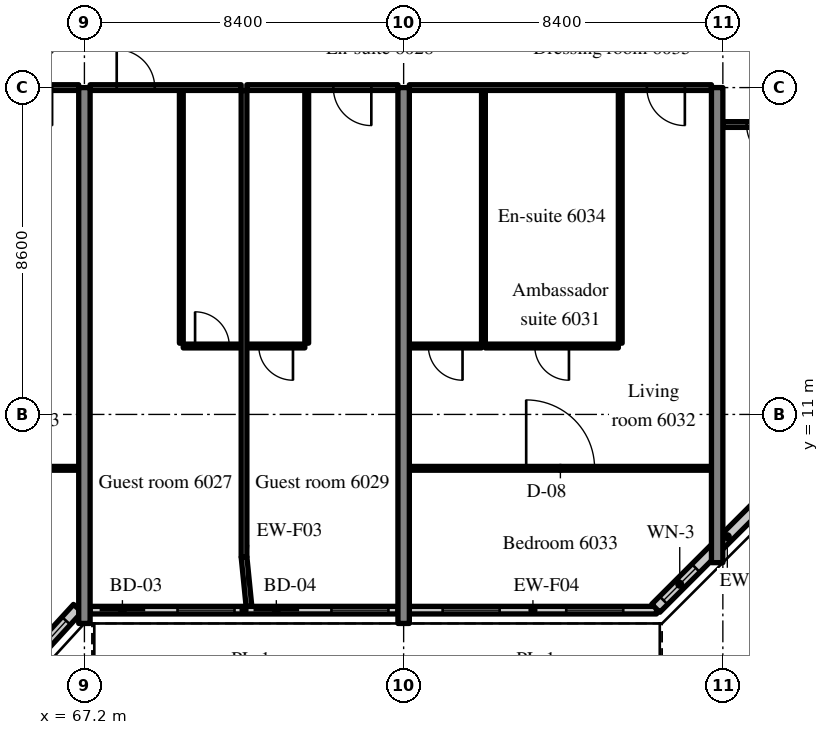
"""IFC4 building model, lengths in metres.
Left out: names, types, materials, properties, quantities, classifications, styles, units other than length and angle.
Written with IfcOpenShell. Run it as: python <this file> out.ifc"""

import sys

from ifc_helpers import new_model, si_unit, direction, frame, frame_2d, origin, place, context, subcontext, project, spatial, rectangle, extrude, source, transform, mapped, element, fill, save


model = new_model("IFC4")
c1 = context("Model", 3, precision=1e-05, world=origin(), true_north=direction((0.0, 1.0)))
c2 = subcontext(c1, "Body", "Model", "MODEL_VIEW")
j1 = project(units=[si_unit("LENGTHUNIT", "METRE"), si_unit("PLANEANGLEUNIT", "RADIAN")], contexts=[c1])
p1 = place(None, origin())
s1 = spatial("IfcSite", under=j1, at=p1, CompositionType="ELEMENT")
p2 = place(p1, origin())
s2 = spatial("IfcBuilding", under=s1, at=p2, CompositionType="ELEMENT")
p3 = place(p2, frame((0.0, 0.0, 249.1)))
s3 = spatial("IfcBuildingStorey", under=s2, at=p3, CompositionType="ELEMENT", Elevation=249.1)
m1 = source(origin(), c2, "Body", "SweptSolid", [
    extrude(rectangle(XDim=14.1, YDim=0.3, at=frame_2d((7.05, 0.0))), origin(), (0.0, 0.0, 1.0), 3.62),
])
for number, where, z_axis, x_axis in (
    (1, (67.2, 5.5, 0.0), (0.0, 0.0, 1.0), (0.0, 1.0, 0.0)),
    (2, (75.6, 5.5, 0.0), (0.0, 0.0, 1.0), (0.0, 1.0, 0.0)),
):
    element("IfcWall", number, at=place(p3, frame(where, z_axis=z_axis, x_axis=x_axis)), inside=s3, PredefinedType="SHEAR", context=c2, shape_type="MappedRepresentation", body=[
        mapped(m1, transform((0.0, 0.0, 0.0), scale=1.0)),
    ])
m2 = source(origin(), c2, "Body", "SweptSolid", [
    extrude(rectangle(XDim=12.5, YDim=0.3, at=frame_2d((6.25, 0.0))), origin(), (0.0, 0.0, 1.0), 3.62),
])
p4 = place(p3, frame((83.85, 7.1, 0.0), z_axis=(0.0, 0.0, 1.0), x_axis=(0.0, 1.0, 0.0)))
e3 = element("IfcWall", 3, at=p4, inside=s3, PredefinedType="SHEAR", context=c2, shape_type="MappedRepresentation", body=[
    mapped(m2, transform((0.0, 0.0, 0.0), scale=1.0)),
])
m3 = source(origin(), c2, "Body", "SweptSolid", [
    extrude(rectangle(XDim=2.398, YDim=0.3, at=frame_2d((1.199, 0.0))), origin(), (0.0, 0.0, 1.0), 3.62),
])
p5 = place(p3, frame((65.404, 4.131, 0.0), z_axis=(0.0, 0.0, 1.0), x_axis=(0.675374189419, 0.737475222815, 0.0)))
e4 = element("IfcWall", 4, at=p5, inside=s3, PredefinedType="SOLIDWALL", context=c2, shape_type="MappedRepresentation", body=[
    mapped(m3, transform((0.0, 0.0, 0.0), scale=1.0)),
])
m4 = source(origin(), c2, "Body", "SweptSolid", [
    extrude(rectangle(XDim=1.5, YDim=2.0, at=frame_2d((0.75, 1.0))), frame((0.0, 0.16, 0.0), z_axis=(0.0, -1.0, 0.0), x_axis=(1.0, 0.0, 0.0)), (0.0, 0.0, 1.0), 0.32),
])
p6 = place(p5, frame((0.449, 0.0, 0.9)))
e5 = element("IfcOpeningElement", 5, at=p6, cuts=e4, PredefinedType="OPENING", context=c2, shape_type="MappedRepresentation", body=[
    mapped(m4, transform((0.0, 0.0, 0.0), scale=1.0)),
])
m5 = source(origin(), c2, "Body", "SweptSolid", [
    extrude(rectangle(XDim=8.1, YDim=0.2, at=frame_2d((4.05, 0.0))), origin(), (0.0, 0.0, 1.0), 3.02),
])
p7 = place(p3, frame((67.35, 5.85, 0.0), z_axis=(0.0, 0.0, 1.0), x_axis=(1.0, 0.0, 0.0)))
e6 = element("IfcWall", 6, at=p7, inside=s3, PredefinedType="SOLIDWALL", context=c2, shape_type="MappedRepresentation", body=[
    mapped(m5, transform((0.0, 0.0, 0.0), scale=1.0)),
])
m6 = source(origin(), c2, "Body", "SweptSolid", [
    extrude(rectangle(XDim=1.2, YDim=2.4, at=frame_2d((0.6, 1.2))), frame((0.0, 0.11, 0.0), z_axis=(0.0, -1.0, 0.0), x_axis=(1.0, 0.0, 0.0)), (0.0, 0.0, 1.0), 0.22),
])
p8 = place(p7, frame((0.25, 0.0, 0.0)))
e7 = element("IfcOpeningElement", 7, at=p8, cuts=e6, PredefinedType="OPENING", context=c2, shape_type="MappedRepresentation", body=[
    mapped(m6, transform((0.0, 0.0, 0.0), scale=1.0)),
])
m7 = source(origin(), c2, "Body", "SweptSolid", [
    extrude(rectangle(XDim=1.5, YDim=1.5, at=frame_2d((0.75, 0.75))), frame((0.0, 0.11, 0.0), z_axis=(0.0, -1.0, 0.0), x_axis=(1.0, 0.0, 0.0)), (0.0, 0.0, 1.0), 0.22),
])
p9 = place(p7, frame((2.3, 0.0, 0.9)))
e8 = element("IfcOpeningElement", 8, at=p9, cuts=e6, PredefinedType="OPENING", context=c2, shape_type="MappedRepresentation", body=[
    mapped(m7, transform((0.0, 0.0, 0.0), scale=1.0)),
])
p10 = place(p7, frame((4.3, 0.0, 0.0)))
e9 = element("IfcOpeningElement", 9, at=p10, cuts=e6, PredefinedType="OPENING", context=c2, shape_type="MappedRepresentation", body=[
    mapped(m6, transform((0.0, 0.0, 0.0), scale=1.0)),
])
p11 = place(p7, frame((6.35, 0.0, 0.9)))
e10 = element("IfcOpeningElement", 10, at=p11, cuts=e6, PredefinedType="OPENING", context=c2, shape_type="MappedRepresentation", body=[
    mapped(m7, transform((0.0, 0.0, 0.0), scale=1.0)),
])
m8 = source(origin(), c2, "Body", "SweptSolid", [
    extrude(rectangle(XDim=6.505, YDim=0.2, at=frame_2d((3.252, 0.0))), origin(), (0.0, 0.0, 1.0), 3.02),
])
p12 = place(p3, frame((75.75, 5.85, 0.0), z_axis=(0.0, 0.0, 1.0), x_axis=(1.0, 0.0, 0.0)))
e11 = element("IfcWall", 11, at=p12, inside=s3, PredefinedType="SOLIDWALL", context=c2, shape_type="MappedRepresentation", body=[
    mapped(m8, transform((0.0, 0.0, 0.0), scale=1.0)),
])
p13 = place(p12, frame((0.876, 0.0, 0.9)))
e12 = element("IfcOpeningElement", 12, at=p13, cuts=e11, PredefinedType="OPENING", context=c2, shape_type="MappedRepresentation", body=[
    mapped(m7, transform((0.0, 0.0, 0.0), scale=1.0)),
])
p14 = place(p12, frame((4.129, 0.0, 0.9)))
e13 = element("IfcOpeningElement", 13, at=p14, cuts=e11, PredefinedType="OPENING", context=c2, shape_type="MappedRepresentation", body=[
    mapped(m7, transform((0.0, 0.0, 0.0), scale=1.0)),
])
m9 = source(origin(), c2, "Body", "SweptSolid", [
    extrude(rectangle(XDim=5.326, YDim=0.3, at=frame_2d((2.663, 0.0))), origin(), (0.0, 0.0, 1.0), 3.62),
])
p15 = place(p3, frame((82.234, 5.9, 0.0), z_axis=(0.0, 0.0, 1.0), x_axis=(0.707083859269, 0.707129702361, 0.0)))
e14 = element("IfcWall", 14, at=p15, inside=s3, PredefinedType="SOLIDWALL", context=c2, shape_type="MappedRepresentation", body=[
    mapped(m9, transform((0.0, 0.0, 0.0), scale=1.0)),
])
m10 = source(origin(), c2, "Body", "SweptSolid", [
    extrude(rectangle(XDim=1.2, YDim=1.5, at=frame_2d((0.6, 0.75))), frame((0.0, 0.16, 0.0), z_axis=(0.0, -1.0, 0.0), x_axis=(1.0, 0.0, 0.0)), (0.0, 0.0, 1.0), 0.32),
])
p16 = place(p15, frame((0.292, 0.0, 0.9)))
e15 = element("IfcOpeningElement", 15, at=p16, cuts=e14, PredefinedType="OPENING", context=c2, shape_type="MappedRepresentation", body=[
    mapped(m10, transform((0.0, 0.0, 0.0), scale=1.0)),
])
m11 = source(origin(), c2, "Body", "SweptSolid", [
    extrude(rectangle(XDim=8.1, YDim=0.1, at=frame_2d((4.05, 0.0))), origin(), (0.0, 0.0, 1.0), 3.62),
])
p17 = place(p3, frame((58.95, 9.582, 0.0), z_axis=(0.0, 0.0, 1.0), x_axis=(1.0, 0.0, 0.0)))
e16 = element("IfcWall", 16, at=p17, inside=s3, PredefinedType="PARTITIONING", context=c2, shape_type="MappedRepresentation", body=[
    mapped(m11, transform((0.0, 0.0, 0.0), scale=1.0)),
])
m12 = source(origin(), c2, "Body", "SweptSolid", [
    extrude(rectangle(XDim=1.8, YDim=2.1, at=frame_2d((0.9, 1.05))), frame((0.0, 0.06, 0.0), z_axis=(0.0, -1.0, 0.0), x_axis=(1.0, 0.0, 0.0)), (0.0, 0.0, 1.0), 0.12),
])
p18 = place(p17, frame((3.15, 0.0, 0.0)))
e17 = element("IfcOpeningElement", 17, at=p18, cuts=e16, PredefinedType="OPENING", context=c2, shape_type="MappedRepresentation", body=[
    mapped(m12, transform((0.0, 0.0, 0.0), scale=1.0)),
])
m13 = source(origin(), c2, "Body", "SweptSolid", [
    extrude(rectangle(XDim=8.1, YDim=0.15, at=frame_2d((4.05, 0.0))), origin(), (0.0, 0.0, 1.0), 2.92),
])
p19 = place(p3, frame((58.95, 19.6, 0.0), z_axis=(0.0, 0.0, 1.0), x_axis=(1.0, 0.0, 0.0)))
e18 = element("IfcWall", 18, at=p19, inside=s3, PredefinedType="PARTITIONING", context=c2, shape_type="MappedRepresentation", body=[
    mapped(m13, transform((0.0, 0.0, 0.0), scale=1.0)),
])
m14 = source(origin(), c2, "Body", "SweptSolid", [
    extrude(rectangle(XDim=1.0, YDim=2.1, at=frame_2d((0.5, 1.05))), frame((0.0, 0.085, 0.0), z_axis=(0.0, -1.0, 0.0), x_axis=(1.0, 0.0, 0.0)), (0.0, 0.0, 1.0), 0.17),
])
p20 = place(p19, frame((6.4, 0.0, 0.0)))
e19 = element("IfcOpeningElement", 19, at=p20, cuts=e18, PredefinedType="OPENING", context=c2, shape_type="MappedRepresentation", body=[
    mapped(m14, transform((0.0, 0.0, 0.0), scale=1.0)),
])
m15 = source(origin(), c2, "Body", "SweptSolid", [
    extrude(rectangle(XDim=6.65, YDim=0.1, at=frame_2d((3.325, 0.0))), origin(), (0.0, 0.0, 1.0), 3.62),
])
p21 = place(p3, frame((69.75, 12.875, 0.0), z_axis=(0.0, 0.0, 1.0), x_axis=(0.0, 1.0, 0.0)))
e20 = element("IfcWall", 20, at=p21, inside=s3, PredefinedType="PARTITIONING", context=c2, shape_type="MappedRepresentation", body=[
    mapped(m15, transform((0.0, 0.0, 0.0), scale=1.0)),
])
m16 = source(origin(), c2, "Body", "SweptSolid", [
    extrude(rectangle(XDim=1.525, YDim=0.1, at=frame_2d((0.762, 0.0))), origin(), (0.0, 0.0, 1.0), 3.62),
])
p22 = place(p3, frame((69.8, 12.8, 0.0), z_axis=(0.0, 0.0, 1.0), x_axis=(1.0, 0.0, 0.0)))
e21 = element("IfcWall", 21, at=p22, inside=s3, PredefinedType="PARTITIONING", context=c2, shape_type="MappedRepresentation", body=[
    mapped(m16, transform((0.0, 0.0, 0.0), scale=1.0)),
])
m17 = source(origin(), c2, "Body", "SweptSolid", [
    extrude(rectangle(XDim=0.9, YDim=2.1, at=frame_2d((0.45, 1.05))), frame((0.0, 0.06, 0.0), z_axis=(0.0, -1.0, 0.0), x_axis=(1.0, 0.0, 0.0)), (0.0, 0.0, 1.0), 0.12),
])
p23 = place(p22, frame((0.312, 0.0, 0.0)))
e22 = element("IfcOpeningElement", 22, at=p23, cuts=e21, PredefinedType="OPENING", context=c2, shape_type="MappedRepresentation", body=[
    mapped(m17, transform((0.0, 0.0, 0.0), scale=1.0)),
])
m18 = source(origin(), c2, "Body", "SweptSolid", [
    extrude(rectangle(XDim=3.975, YDim=0.15, at=frame_2d((1.987, 0.0))), origin(), (0.0, 0.0, 1.0), 2.92),
])
p24 = place(p3, frame((67.35, 19.6, 0.0), z_axis=(0.0, 0.0, 1.0), x_axis=(1.0, 0.0, 0.0)))
e23 = element("IfcWall", 23, at=p24, inside=s3, PredefinedType="PARTITIONING", context=c2, shape_type="MappedRepresentation", body=[
    mapped(m18, transform((0.0, 0.0, 0.0), scale=1.0)),
])
p25 = place(p24, frame((0.7, 0.0, 0.0)))
e24 = element("IfcOpeningElement", 24, at=p25, cuts=e23, PredefinedType="OPENING", context=c2, shape_type="MappedRepresentation", body=[
    mapped(m14, transform((0.0, 0.0, 0.0), scale=1.0)),
])
p26 = place(p3, frame((73.05, 12.875, 0.0), z_axis=(0.0, 0.0, 1.0), x_axis=(0.0, 1.0, 0.0)))
e25 = element("IfcWall", 25, at=p26, inside=s3, PredefinedType="PARTITIONING", context=c2, shape_type="MappedRepresentation", body=[
    mapped(m15, transform((0.0, 0.0, 0.0), scale=1.0)),
])
p27 = place(p3, frame((71.475, 12.8, 0.0), z_axis=(0.0, 0.0, 1.0), x_axis=(1.0, 0.0, 0.0)))
e26 = element("IfcWall", 26, at=p27, inside=s3, PredefinedType="PARTITIONING", context=c2, shape_type="MappedRepresentation", body=[
    mapped(m16, transform((0.0, 0.0, 0.0), scale=1.0)),
])
p28 = place(p27, frame((0.313, 0.0, 0.0)))
e27 = element("IfcOpeningElement", 27, at=p28, cuts=e26, PredefinedType="OPENING", context=c2, shape_type="MappedRepresentation", body=[
    mapped(m17, transform((0.0, 0.0, 0.0), scale=1.0)),
])
p29 = place(p3, frame((71.475, 19.6, 0.0), z_axis=(0.0, 0.0, 1.0), x_axis=(1.0, 0.0, 0.0)))
e28 = element("IfcWall", 28, at=p29, inside=s3, PredefinedType="PARTITIONING", context=c2, shape_type="MappedRepresentation", body=[
    mapped(m18, transform((0.0, 0.0, 0.0), scale=1.0)),
])
p30 = place(p29, frame((2.275, 0.0, 0.0)))
e29 = element("IfcOpeningElement", 29, at=p30, cuts=e28, PredefinedType="OPENING", context=c2, shape_type="MappedRepresentation", body=[
    mapped(m14, transform((0.0, 0.0, 0.0), scale=1.0)),
])
m19 = source(origin(), c2, "Body", "SweptSolid", [
    extrude(rectangle(XDim=12.275, YDim=0.15, at=frame_2d((6.137, 0.0))), origin(), (0.0, 0.0, 1.0), 3.62),
])
p31 = place(p3, frame((71.4, 7.25, 0.0), z_axis=(0.0, 0.0, 1.0), x_axis=(0.0, 1.0, 0.0)))
e30 = element("IfcWall", 30, at=p31, inside=s3, PredefinedType="PARTITIONING", context=c2, shape_type="MappedRepresentation", body=[
    mapped(m19, transform((0.0, 0.0, 0.0), scale=1.0)),
])
for number, where, z_axis, x_axis in (
    (31, (81.3, 12.875, 0.0), (0.0, 0.0, 1.0), (0.0, 1.0, 0.0)),
    (32, (77.7, 12.875, 0.0), (0.0, 0.0, 1.0), (0.0, 1.0, 0.0)),
):
    element("IfcWall", number, at=place(p3, frame(where, z_axis=z_axis, x_axis=x_axis)), inside=s3, PredefinedType="PARTITIONING", context=c2, shape_type="MappedRepresentation", body=[
        mapped(m15, transform((0.0, 0.0, 0.0), scale=1.0)),
    ])
m20 = source(origin(), c2, "Body", "SweptSolid", [
    extrude(rectangle(XDim=3.5, YDim=0.1, at=frame_2d((1.75, 0.0))), origin(), (0.0, 0.0, 1.0), 3.62),
])
p32 = place(p3, frame((77.75, 12.8, 0.0), z_axis=(0.0, 0.0, 1.0), x_axis=(1.0, 0.0, 0.0)))
e33 = element("IfcWall", 33, at=p32, inside=s3, PredefinedType="PARTITIONING", context=c2, shape_type="MappedRepresentation", body=[
    mapped(m20, transform((0.0, 0.0, 0.0), scale=1.0)),
])
p33 = place(p32, frame((1.3, 0.0, 0.0)))
e34 = element("IfcOpeningElement", 34, at=p33, cuts=e33, PredefinedType="OPENING", context=c2, shape_type="MappedRepresentation", body=[
    mapped(m17, transform((0.0, 0.0, 0.0), scale=1.0)),
])
m21 = source(origin(), c2, "Body", "SweptSolid", [
    extrude(rectangle(XDim=1.9, YDim=0.1, at=frame_2d((0.95, 0.0))), origin(), (0.0, 0.0, 1.0), 3.62),
])
p34 = place(p3, frame((75.75, 12.8, 0.0), z_axis=(0.0, 0.0, 1.0), x_axis=(1.0, 0.0, 0.0)))
e35 = element("IfcWall", 35, at=p34, inside=s3, PredefinedType="PARTITIONING", context=c2, shape_type="MappedRepresentation", body=[
    mapped(m21, transform((0.0, 0.0, 0.0), scale=1.0)),
])
p35 = place(p34, frame((0.5, 0.0, 0.0)))
e36 = element("IfcOpeningElement", 36, at=p35, cuts=e35, PredefinedType="OPENING", context=c2, shape_type="MappedRepresentation", body=[
    mapped(m17, transform((0.0, 0.0, 0.0), scale=1.0)),
])
m22 = source(origin(), c2, "Body", "SweptSolid", [
    extrude(rectangle(XDim=7.95, YDim=0.1, at=frame_2d((3.975, 0.0))), origin(), (0.0, 0.0, 1.0), 3.62),
])
p36 = place(p3, frame((75.75, 9.582, 0.0), z_axis=(0.0, 0.0, 1.0), x_axis=(1.0, 0.0, 0.0)))
e37 = element("IfcWall", 37, at=p36, inside=s3, PredefinedType="PARTITIONING", context=c2, shape_type="MappedRepresentation", body=[
    mapped(m22, transform((0.0, 0.0, 0.0), scale=1.0)),
])
p37 = place(p36, frame((3.075, 0.0, 0.0)))
e38 = element("IfcOpeningElement", 38, at=p37, cuts=e37, PredefinedType="OPENING", context=c2, shape_type="MappedRepresentation", body=[
    mapped(m12, transform((0.0, 0.0, 0.0), scale=1.0)),
])
m23 = source(origin(), c2, "Body", "SweptSolid", [
    extrude(rectangle(XDim=7.95, YDim=0.15, at=frame_2d((3.975, 0.0))), origin(), (0.0, 0.0, 1.0), 2.92),
])
p38 = place(p3, frame((75.75, 19.6, 0.0), z_axis=(0.0, 0.0, 1.0), x_axis=(1.0, 0.0, 0.0)))
e39 = element("IfcWall", 39, at=p38, inside=s3, PredefinedType="PARTITIONING", context=c2, shape_type="MappedRepresentation", body=[
    mapped(m23, transform((0.0, 0.0, 0.0), scale=1.0)),
])
p39 = place(p38, frame((6.25, 0.0, 0.0)))
e40 = element("IfcOpeningElement", 40, at=p39, cuts=e39, PredefinedType="OPENING", context=c2, shape_type="MappedRepresentation", body=[
    mapped(m14, transform((0.0, 0.0, 0.0), scale=1.0)),
])
m24 = source(origin(), c2, "Body", "SweptSolid", [
    extrude(rectangle(XDim=1.9, YDim=0.15, at=frame_2d((0.95, 0.0))), origin(), (0.0, 0.0, 1.0), 2.92),
])
p40 = place(p3, frame((84.0, 18.628, 0.0), z_axis=(0.0, 0.0, 1.0), x_axis=(1.0, 0.0, 0.0)))
e41 = element("IfcWall", 41, at=p40, inside=s3, PredefinedType="PARTITIONING", context=c2, shape_type="MappedRepresentation", body=[
    mapped(m24, transform((0.0, 0.0, 0.0), scale=1.0)),
])
p41 = place(p40, frame((0.625, 0.0, 0.0)))
e42 = element("IfcOpeningElement", 42, at=p41, cuts=e41, PredefinedType="OPENING", context=c2, shape_type="MappedRepresentation", body=[
    mapped(m14, transform((0.0, 0.0, 0.0), scale=1.0)),
])
m25 = source(origin(), c2, "Body", "SweptSolid", [
    extrude(rectangle(XDim=1.307, YDim=0.15, at=frame_2d((0.653, 0.0))), origin(), (0.0, 0.0, 1.0), 3.62),
])
p42 = place(p3, frame((71.53, 5.95, 0.0), z_axis=(0.0, 0.0, 1.0), x_axis=(-0.099596223396, 0.99502793543, 0.0)))
e43 = element("IfcWall", 43, at=p42, inside=s3, PredefinedType="PARTITIONING", context=c2, shape_type="MappedRepresentation", body=[
    mapped(m25, transform((0.0, 0.0, 0.0), scale=1.0)),
])
m26 = source(origin(), c2, "Body", "SweptSolid", [
    extrude(rectangle(XDim=1.5, YDim=2.0, at=frame_2d((0.75, 1.0))), frame((0.0, 0.03, 0.0), z_axis=(0.0, -1.0, 0.0), x_axis=(1.0, 0.0, 0.0)), (0.0, 0.0, 1.0), 0.06),
])
p43 = place(p6, origin())
e44 = element("IfcWindow", 44, at=p43, inside=s3, PartitioningType="SINGLE_PANEL", PredefinedType="WINDOW", context=c2, shape_type="MappedRepresentation", body=[
    mapped(m26, transform((0.0, 0.0, 0.0), scale=1.0)),
])
fill(e5, e44)
m27 = source(origin(), c2, "Body", "SweptSolid", [
    extrude(rectangle(XDim=1.2, YDim=2.4, at=frame_2d((0.6, 1.2))), frame((0.0, 0.025, 0.0), z_axis=(0.0, -1.0, 0.0), x_axis=(1.0, 0.0, 0.0)), (0.0, 0.0, 1.0), 0.05),
])
p44 = place(p8, origin())
e45 = element("IfcDoor", 45, at=p44, inside=s3, OperationType="SLIDING_TO_LEFT", PredefinedType="DOOR", context=c2, shape_type="MappedRepresentation", body=[
    mapped(m27, transform((0.0, 0.0, 0.0), scale=1.0)),
])
fill(e7, e45)
m28 = source(origin(), c2, "Body", "SweptSolid", [
    extrude(rectangle(XDim=1.5, YDim=1.5, at=frame_2d((0.75, 0.75))), frame((0.0, 0.03, 0.0), z_axis=(0.0, -1.0, 0.0), x_axis=(1.0, 0.0, 0.0)), (0.0, 0.0, 1.0), 0.06),
])
p45 = place(p9, origin())
e46 = element("IfcWindow", 46, at=p45, inside=s3, PartitioningType="SINGLE_PANEL", PredefinedType="WINDOW", context=c2, shape_type="MappedRepresentation", body=[
    mapped(m28, transform((0.0, 0.0, 0.0), scale=1.0)),
])
fill(e8, e46)
p46 = place(p10, origin())
e47 = element("IfcDoor", 47, at=p46, inside=s3, OperationType="SLIDING_TO_RIGHT", PredefinedType="DOOR", context=c2, shape_type="MappedRepresentation", body=[
    mapped(m27, transform((0.0, 0.0, 0.0), scale=1.0)),
])
fill(e9, e47)
p47 = place(p11, origin())
e48 = element("IfcWindow", 48, at=p47, inside=s3, PartitioningType="SINGLE_PANEL", PredefinedType="WINDOW", context=c2, shape_type="MappedRepresentation", body=[
    mapped(m28, transform((0.0, 0.0, 0.0), scale=1.0)),
])
fill(e10, e48)
p48 = place(p13, origin())
e49 = element("IfcWindow", 49, at=p48, inside=s3, PartitioningType="SINGLE_PANEL", PredefinedType="WINDOW", context=c2, shape_type="MappedRepresentation", body=[
    mapped(m28, transform((0.0, 0.0, 0.0), scale=1.0)),
])
fill(e12, e49)
p49 = place(p14, origin())
e50 = element("IfcWindow", 50, at=p49, inside=s3, PartitioningType="SINGLE_PANEL", PredefinedType="WINDOW", context=c2, shape_type="MappedRepresentation", body=[
    mapped(m28, transform((0.0, 0.0, 0.0), scale=1.0)),
])
fill(e13, e50)
m29 = source(origin(), c2, "Body", "SweptSolid", [
    extrude(rectangle(XDim=1.2, YDim=1.5, at=frame_2d((0.6, 0.75))), frame((0.0, 0.03, 0.0), z_axis=(0.0, -1.0, 0.0), x_axis=(1.0, 0.0, 0.0)), (0.0, 0.0, 1.0), 0.06),
])
p50 = place(p16, origin())
e51 = element("IfcWindow", 51, at=p50, inside=s3, PartitioningType="SINGLE_PANEL", PredefinedType="WINDOW", context=c2, shape_type="MappedRepresentation", body=[
    mapped(m29, transform((0.0, 0.0, 0.0), scale=1.0)),
])
fill(e15, e51)
m30 = source(origin(), c2, "Body", "SweptSolid", [
    extrude(rectangle(XDim=0.9, YDim=2.1, at=frame_2d((0.45, 1.05))), frame((0.0, 0.025, 0.0), z_axis=(0.0, -1.0, 0.0), x_axis=(1.0, 0.0, 0.0)), (0.0, 0.0, 1.0), 0.05),
])
p51 = place(p23, origin())
e52 = element("IfcDoor", 52, at=p51, inside=s3, OperationType="SINGLE_SWING_LEFT", PredefinedType="DOOR", context=c2, shape_type="MappedRepresentation", body=[
    mapped(m30, transform((0.0, 0.0, 0.0), scale=1.0)),
])
fill(e22, e52)
m31 = source(origin(), c2, "Body", "SweptSolid", [
    extrude(rectangle(XDim=1.0, YDim=2.1, at=frame_2d((0.5, 1.05))), frame((0.0, 0.025, 0.0), z_axis=(0.0, -1.0, 0.0), x_axis=(1.0, 0.0, 0.0)), (0.0, 0.0, 1.0), 0.05),
])
p52 = place(p25, origin())
e53 = element("IfcDoor", 53, at=p52, inside=s3, OperationType="SINGLE_SWING_LEFT", PredefinedType="DOOR", context=c2, shape_type="MappedRepresentation", body=[
    mapped(m31, transform((0.0, 0.0, 0.0), scale=1.0)),
])
fill(e24, e53)
p53 = place(p28, origin())
e54 = element("IfcDoor", 54, at=p53, inside=s3, OperationType="SINGLE_SWING_RIGHT", PredefinedType="DOOR", context=c2, shape_type="MappedRepresentation", body=[
    mapped(m30, transform((0.0, 0.0, 0.0), scale=1.0)),
])
fill(e27, e54)
p54 = place(p30, origin())
e55 = element("IfcDoor", 55, at=p54, inside=s3, OperationType="SINGLE_SWING_RIGHT", PredefinedType="DOOR", context=c2, shape_type="MappedRepresentation", body=[
    mapped(m31, transform((0.0, 0.0, 0.0), scale=1.0)),
])
fill(e29, e55)
p55 = place(p33, origin())
e56 = element("IfcDoor", 56, at=p55, inside=s3, OperationType="SINGLE_SWING_RIGHT", PredefinedType="DOOR", context=c2, shape_type="MappedRepresentation", body=[
    mapped(m30, transform((0.0, 0.0, 0.0), scale=1.0)),
])
fill(e34, e56)
p56 = place(p35, origin())
e57 = element("IfcDoor", 57, at=p56, inside=s3, OperationType="SINGLE_SWING_RIGHT", PredefinedType="DOOR", context=c2, shape_type="MappedRepresentation", body=[
    mapped(m30, transform((0.0, 0.0, 0.0), scale=1.0)),
])
fill(e36, e57)
m32 = source(origin(), c2, "Body", "SweptSolid", [
    extrude(rectangle(XDim=1.8, YDim=2.1, at=frame_2d((0.9, 1.05))), frame((0.0, 0.025, 0.0), z_axis=(0.0, -1.0, 0.0), x_axis=(1.0, 0.0, 0.0)), (0.0, 0.0, 1.0), 0.05),
])
p57 = place(p37, origin())
e58 = element("IfcDoor", 58, at=p57, inside=s3, OperationType="DOUBLE_DOOR_SINGLE_SWING", PredefinedType="DOOR", context=c2, shape_type="MappedRepresentation", body=[
    mapped(m32, transform((0.0, 0.0, 0.0), scale=1.0)),
])
fill(e38, e58)
p58 = place(p39, origin())
e59 = element("IfcDoor", 59, at=p58, inside=s3, OperationType="SINGLE_SWING_RIGHT", PredefinedType="DOOR", context=c2, shape_type="MappedRepresentation", body=[
    mapped(m31, transform((0.0, 0.0, 0.0), scale=1.0)),
])
fill(e40, e59)
p59 = place(p41, origin())
e60 = element("IfcDoor", 60, at=p59, inside=s3, OperationType="SINGLE_SWING_RIGHT", PredefinedType="DOOR", context=c2, shape_type="MappedRepresentation", body=[
    mapped(m31, transform((0.0, 0.0, 0.0), scale=1.0)),
])
fill(e42, e60)
save(model, sys.argv[1])
